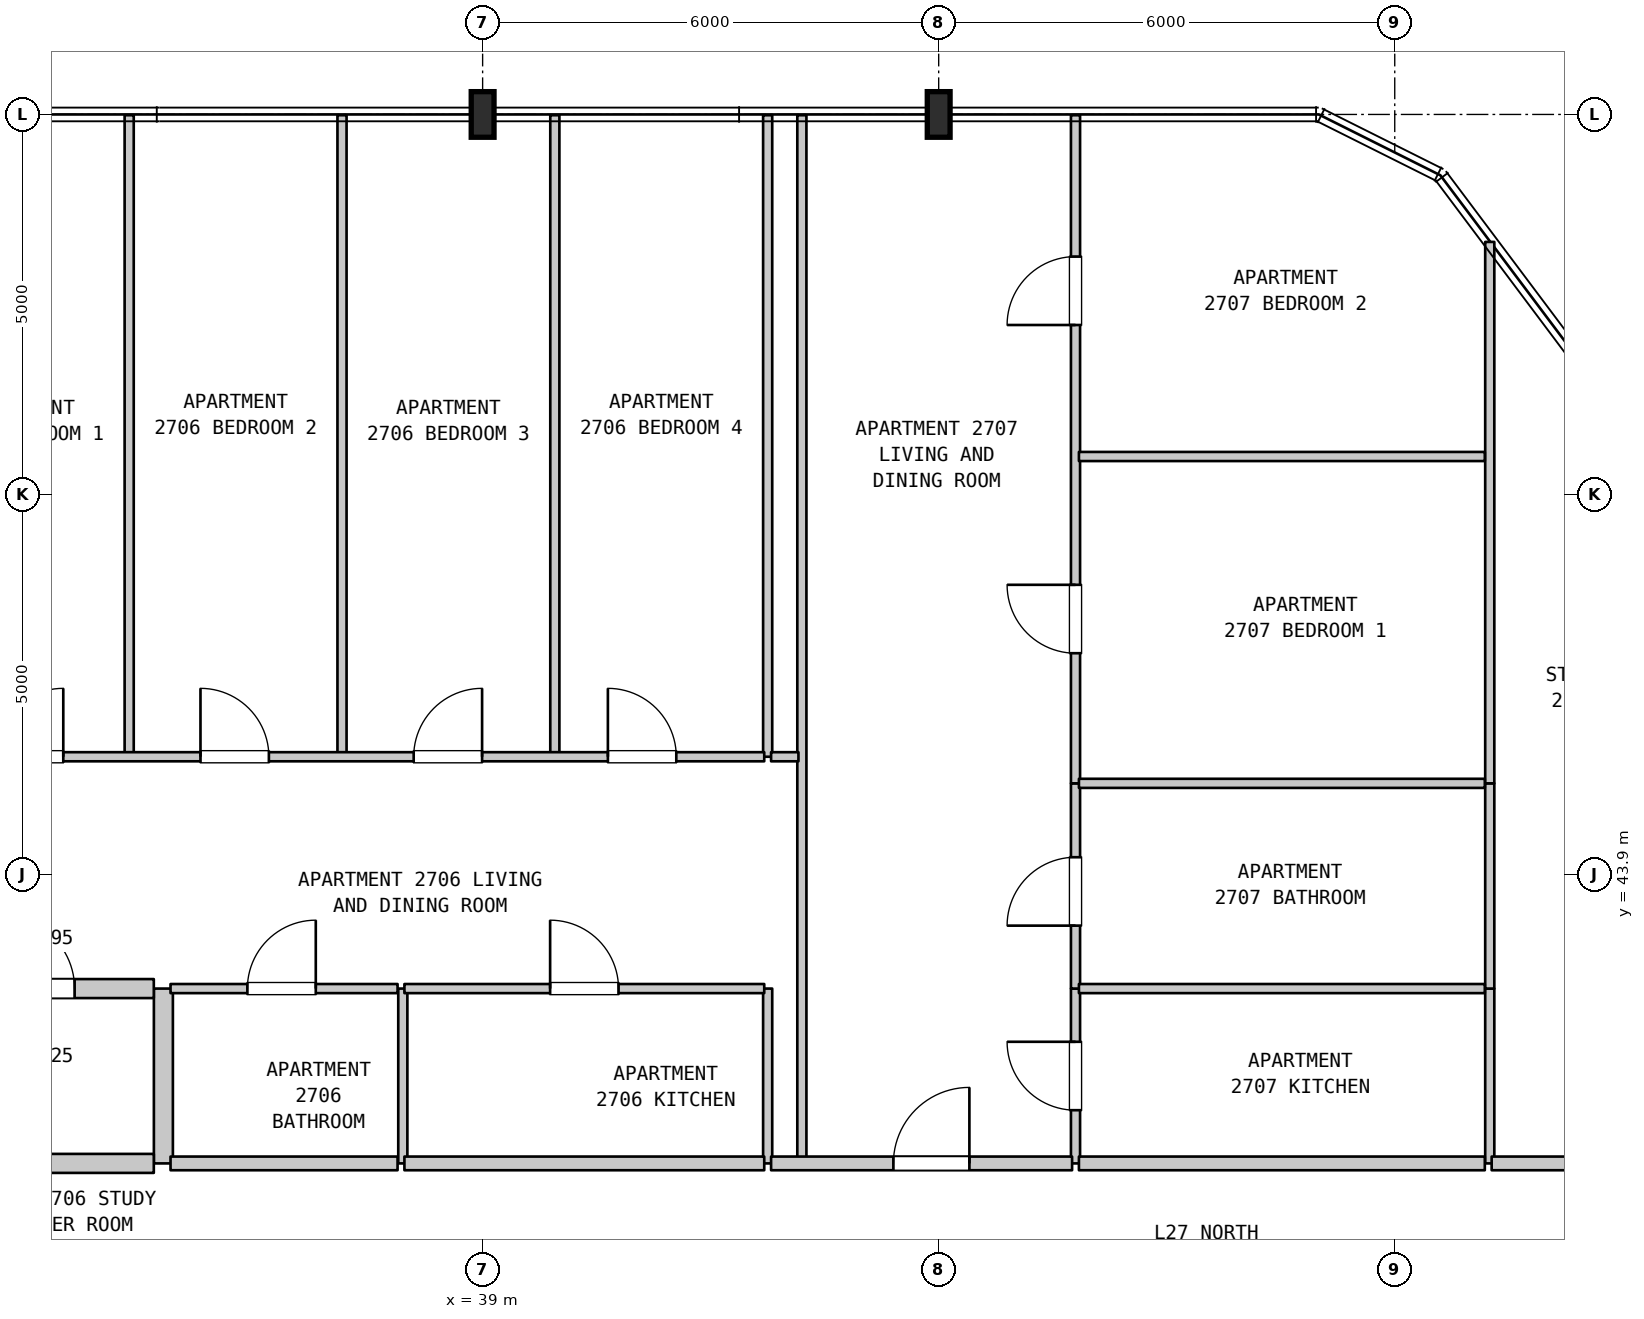
"""IFC4 building model, lengths in metres.
Left out: names, types, materials, properties, quantities, classifications, styles, units other than length and angle.
Written with IfcOpenShell. Run it as: python <this file> out.ifc"""

import sys

from ifc_helpers import new_model, si_unit, direction, frame, frame_2d, origin, origin_2d, place, context, subcontext, project, spatial, rectangle, i_section, extrude, element, fill, save


model = new_model("IFC4")
c1 = context("Model", 3, precision=1e-05, world=origin(), true_north=direction((0.0, 1.0)))
c2 = subcontext(c1, "Body", "Model", "MODEL_VIEW")
j1 = project(units=[si_unit("LENGTHUNIT", "METRE"), si_unit("PLANEANGLEUNIT", "RADIAN")], contexts=[c1])
p1 = place(None, origin())
s1 = spatial("IfcSite", under=j1, at=p1, CompositionType="ELEMENT")
p2 = place(p1, origin())
s2 = spatial("IfcBuilding", under=s1, at=p2, CompositionType="ELEMENT")
p3 = place(p2, frame((0.0, 0.0, 113.1)))
s3 = spatial("IfcBuildingStorey", under=s2, at=p3, CompositionType="ELEMENT", Elevation=113.1)
for number, where, z_axis, x_axis in (
    (1, (39.0, 53.9, 0.0), (0.0, 0.0, 1.0), (1.0, 0.0, 0.0)),
    (2, (45.0, 53.9, 0.0), (0.0, 0.0, 1.0), (1.0, 0.0, 0.0)),
):
    element("IfcColumn", number, at=place(p3, frame(where, z_axis=z_axis, x_axis=x_axis)), inside=s3, PredefinedType="COLUMN", context=c2, shape_type="SweptSolid", body=[
        extrude(i_section(OverallWidth=0.3, OverallDepth=0.6, WebThickness=0.015, FlangeThickness=0.03, FilletRadius=0.027, at=origin_2d()), origin(), (0.0, 0.0, 1.0), 3.7),
    ])
p4 = place(p3, frame((34.35, 45.45, 0.0), z_axis=(0.0, 0.0, 1.0), x_axis=(0.0, 1.0, 0.0)))
e3 = element("IfcWall", 3, at=p4, inside=s3, PredefinedType="PARTITIONING", context=c2, shape_type="SweptSolid", body=[
    extrude(rectangle(XDim=8.44, YDim=0.12, at=frame_2d((4.22, 0.0))), origin(), (0.0, 0.0, 1.0), 3.385),
])
p5 = place(p3, frame((34.8, 40.1, 0.0), z_axis=(0.0, 0.0, 1.0), x_axis=(0.0, 1.0, 0.0)))
e4 = element("IfcWall", 4, at=p5, inside=s3, PredefinedType="STANDARD", context=c2, shape_type="SweptSolid", body=[
    extrude(rectangle(XDim=2.3, YDim=0.25, at=frame_2d((1.15, 0.0))), origin(), (0.0, 0.0, 1.0), 3.385),
])
p6 = place(p3, frame((37.15, 45.45, 0.0), z_axis=(0.0, 0.0, 1.0), x_axis=(0.0, 1.0, 0.0)))
e5 = element("IfcWall", 5, at=p6, inside=s3, PredefinedType="PARTITIONING", context=c2, shape_type="SweptSolid", body=[
    extrude(rectangle(XDim=8.44, YDim=0.12, at=frame_2d((4.22, 0.0))), origin(), (0.0, 0.0, 1.0), 3.385),
])
p7 = place(p3, frame((37.95, 40.1, 0.0), z_axis=(0.0, 0.0, 1.0), x_axis=(0.0, 1.0, 0.0)))
e6 = element("IfcWall", 6, at=p7, inside=s3, PredefinedType="PARTITIONING", context=c2, shape_type="SweptSolid", body=[
    extrude(rectangle(XDim=2.3, YDim=0.12, at=frame_2d((1.15, 0.0))), origin(), (0.0, 0.0, 1.0), 3.385),
])
p8 = place(p3, frame((39.95, 45.45, 0.0), z_axis=(0.0, 0.0, 1.0), x_axis=(0.0, 1.0, 0.0)))
e7 = element("IfcWall", 7, at=p8, inside=s3, PredefinedType="PARTITIONING", context=c2, shape_type="SweptSolid", body=[
    extrude(rectangle(XDim=8.44, YDim=0.12, at=frame_2d((4.22, 0.0))), origin(), (0.0, 0.0, 1.0), 3.385),
])
p9 = place(p3, frame((42.75, 40.1, 0.0), z_axis=(0.0, 0.0, 1.0), x_axis=(0.0, 1.0, 0.0)))
e8 = element("IfcWall", 8, at=p9, inside=s3, PredefinedType="PARTITIONING", context=c2, shape_type="SweptSolid", body=[
    extrude(rectangle(XDim=2.3, YDim=0.12, at=frame_2d((1.15, 0.0))), origin(), (0.0, 0.0, 1.0), 3.385),
])
p10 = place(p3, frame((42.75, 45.45, 0.0), z_axis=(0.0, 0.0, 1.0), x_axis=(0.0, 1.0, 0.0)))
e9 = element("IfcWall", 9, at=p10, inside=s3, PredefinedType="PARTITIONING", context=c2, shape_type="SweptSolid", body=[
    extrude(rectangle(XDim=8.44, YDim=0.12, at=frame_2d((4.22, 0.0))), origin(), (0.0, 0.0, 1.0), 3.385),
])
p11 = place(p3, frame((43.2, 40.1, 0.0), z_axis=(0.0, 0.0, 1.0), x_axis=(0.0, 1.0, 0.0)))
e10 = element("IfcWall", 10, at=p11, inside=s3, PredefinedType="PARTITIONING", context=c2, shape_type="SweptSolid", body=[
    extrude(rectangle(XDim=13.79, YDim=0.12, at=frame_2d((6.895, 0.0))), origin(), (0.0, 0.0, 1.0), 3.385),
])
p12 = place(p3, frame((46.8, 40.1, 0.0), z_axis=(0.0, 0.0, 1.0), x_axis=(0.0, 1.0, 0.0)))
e11 = element("IfcWall", 11, at=p12, inside=s3, PredefinedType="PARTITIONING", context=c2, shape_type="SweptSolid", body=[
    extrude(rectangle(XDim=2.3, YDim=0.12, at=frame_2d((1.15, 0.0))), origin(), (0.0, 0.0, 1.0), 3.385),
])
p13 = place(p12, frame((0.7, 0.0, 0.0)))
e12 = element("IfcOpeningElement", 12, at=p13, cuts=e11, PredefinedType="OPENING", context=c2, shape_type="SweptSolid", body=[
    extrude(rectangle(XDim=0.9, YDim=2.15, at=frame_2d((0.45, 1.075))), frame((0.0, 0.07, 0.0), z_axis=(0.0, -1.0, 0.0), x_axis=(1.0, 0.0, 0.0)), (0.0, 0.0, 1.0), 0.14),
])
p14 = place(p3, frame((46.8, 42.4, 0.0), z_axis=(0.0, 0.0, 1.0), x_axis=(0.0, 1.0, 0.0)))
e13 = element("IfcWall", 13, at=p14, inside=s3, PredefinedType="PARTITIONING", context=c2, shape_type="SweptSolid", body=[
    extrude(rectangle(XDim=2.7, YDim=0.12, at=frame_2d((1.35, 0.0))), origin(), (0.0, 0.0, 1.0), 3.385),
])
p15 = place(p14, frame((0.828, 0.0, 0.0)))
e14 = element("IfcOpeningElement", 14, at=p15, cuts=e13, PredefinedType="OPENING", context=c2, shape_type="SweptSolid", body=[
    extrude(rectangle(XDim=0.9, YDim=2.1, at=frame_2d((0.45, 1.05))), frame((0.0, 0.07, 0.0), z_axis=(0.0, -1.0, 0.0), x_axis=(1.0, 0.0, 0.0)), (0.0, 0.0, 1.0), 0.14),
])
p16 = place(p3, frame((46.8, 45.1, 0.0), z_axis=(0.0, 0.0, 1.0), x_axis=(0.0, 1.0, 0.0)))
e15 = element("IfcWall", 15, at=p16, inside=s3, PredefinedType="PARTITIONING", context=c2, shape_type="SweptSolid", body=[
    extrude(rectangle(XDim=8.79, YDim=0.12, at=frame_2d((4.395, 0.0))), origin(), (0.0, 0.0, 1.0), 3.385),
])
p17 = place(p16, frame((1.712, 0.0, 0.0)))
e16 = element("IfcOpeningElement", 16, at=p17, cuts=e15, PredefinedType="OPENING", context=c2, shape_type="SweptSolid", body=[
    extrude(rectangle(XDim=0.9, YDim=2.15, at=frame_2d((0.45, 1.075))), frame((0.0, 0.07, 0.0), z_axis=(0.0, -1.0, 0.0), x_axis=(1.0, 0.0, 0.0)), (0.0, 0.0, 1.0), 0.14),
])
p18 = place(p16, frame((6.03, 0.0, 0.0)))
e17 = element("IfcOpeningElement", 17, at=p18, cuts=e15, PredefinedType="OPENING", context=c2, shape_type="SweptSolid", body=[
    extrude(rectangle(XDim=0.9, YDim=2.15, at=frame_2d((0.45, 1.075))), frame((0.0, 0.07, 0.0), z_axis=(0.0, -1.0, 0.0), x_axis=(1.0, 0.0, 0.0)), (0.0, 0.0, 1.0), 0.14),
])
p19 = place(p3, frame((52.25, 40.1, 0.0), z_axis=(0.0, 0.0, 1.0), x_axis=(0.0, 1.0, 0.0)))
e18 = element("IfcWall", 18, at=p19, inside=s3, PredefinedType="PARTITIONING", context=c2, shape_type="SweptSolid", body=[
    extrude(rectangle(XDim=2.3, YDim=0.12, at=frame_2d((1.15, 0.0))), origin(), (0.0, 0.0, 1.0), 3.385),
])
p20 = place(p3, frame((52.25, 42.4, 0.0), z_axis=(0.0, 0.0, 1.0), x_axis=(0.0, 1.0, 0.0)))
e19 = element("IfcWall", 19, at=p20, inside=s3, PredefinedType="PARTITIONING", context=c2, shape_type="SweptSolid", body=[
    extrude(rectangle(XDim=2.7, YDim=0.12, at=frame_2d((1.35, 0.0))), origin(), (0.0, 0.0, 1.0), 3.385),
])
p21 = place(p3, frame((52.25, 45.1, 0.0), z_axis=(0.0, 0.0, 1.0), x_axis=(0.0, 1.0, 0.0)))
e20 = element("IfcWall", 20, at=p21, inside=s3, PredefinedType="PARTITIONING", context=c2, shape_type="SweptSolid", body=[
    extrude(rectangle(XDim=7.123, YDim=0.12, at=frame_2d((3.562, 0.0))), origin(), (0.0, 0.0, 1.0), 3.385),
])
p22 = place(p3, frame((31.64, 40.1, 0.0), z_axis=(0.0, 0.0, 1.0), x_axis=(1.0, 0.0, 0.0)))
e21 = element("IfcWall", 21, at=p22, inside=s3, PredefinedType="STANDARD", context=c2, shape_type="SweptSolid", body=[
    extrude(rectangle(XDim=3.034, YDim=0.25, at=frame_2d((1.517, 0.0))), origin(), (0.0, 0.0, 1.0), 3.385),
])
p23 = place(p3, frame((34.894, 40.1, 0.0), z_axis=(0.0, 0.0, 1.0), x_axis=(1.0, 0.0, 0.0)))
e22 = element("IfcWall", 22, at=p23, inside=s3, PredefinedType="STANDARD", context=c2, shape_type="SweptSolid", body=[
    extrude(rectangle(XDim=2.987, YDim=0.18, at=frame_2d((1.494, 0.0))), origin(), (0.0, 0.0, 1.0), 3.385),
])
p24 = place(p3, frame((37.971, 40.1, 0.0), z_axis=(0.0, 0.0, 1.0), x_axis=(1.0, 0.0, 0.0)))
e23 = element("IfcWall", 23, at=p24, inside=s3, PredefinedType="STANDARD", context=c2, shape_type="SweptSolid", body=[
    extrude(rectangle(XDim=4.734, YDim=0.18, at=frame_2d((2.367, 0.0))), origin(), (0.0, 0.0, 1.0), 3.385),
])
p25 = place(p3, frame((42.795, 40.1, 0.0), z_axis=(0.0, 0.0, 1.0), x_axis=(1.0, 0.0, 0.0)))
e24 = element("IfcWall", 24, at=p25, inside=s3, PredefinedType="STANDARD", context=c2, shape_type="SweptSolid", body=[
    extrude(rectangle(XDim=3.96, YDim=0.18, at=frame_2d((1.98, 0.0))), origin(), (0.0, 0.0, 1.0), 3.385),
])
p26 = place(p25, frame((1.609, 0.0, 0.0)))
e25 = element("IfcOpeningElement", 25, at=p26, cuts=e24, PredefinedType="OPENING", context=c2, shape_type="SweptSolid", body=[
    extrude(rectangle(XDim=1.0, YDim=2.15, at=frame_2d((0.5, 1.075))), frame((0.0, 0.1, 0.0), z_axis=(0.0, -1.0, 0.0), x_axis=(1.0, 0.0, 0.0)), (0.0, 0.0, 1.0), 0.2),
])
p27 = place(p3, frame((46.845, 40.1, 0.0), z_axis=(0.0, 0.0, 1.0), x_axis=(1.0, 0.0, 0.0)))
e26 = element("IfcWall", 26, at=p27, inside=s3, PredefinedType="STANDARD", context=c2, shape_type="SweptSolid", body=[
    extrude(rectangle(XDim=5.34, YDim=0.18, at=frame_2d((2.67, 0.0))), origin(), (0.0, 0.0, 1.0), 3.385),
])
p28 = place(p3, frame((52.275, 40.1, 0.0), z_axis=(0.0, 0.0, 1.0), x_axis=(1.0, 0.0, 0.0)))
e27 = element("IfcWall", 27, at=p28, inside=s3, PredefinedType="STANDARD", context=c2, shape_type="SweptSolid", body=[
    extrude(rectangle(XDim=3.51, YDim=0.18, at=frame_2d((1.755, 0.0))), origin(), (0.0, 0.0, 1.0), 3.385),
])
p29 = place(p28, frame((1.185, 0.0, 0.0)))
e28 = element("IfcOpeningElement", 28, at=p29, cuts=e27, PredefinedType="OPENING", context=c2, shape_type="SweptSolid", body=[
    extrude(rectangle(XDim=1.0, YDim=2.15, at=frame_2d((0.5, 1.075))), frame((0.0, 0.1, 0.0), z_axis=(0.0, -1.0, 0.0), x_axis=(1.0, 0.0, 0.0)), (0.0, 0.0, 1.0), 0.2),
])
p30 = place(p3, frame((31.64, 42.4, 0.0), z_axis=(0.0, 0.0, 1.0), x_axis=(1.0, 0.0, 0.0)))
e29 = element("IfcWall", 29, at=p30, inside=s3, PredefinedType="STANDARD", context=c2, shape_type="SweptSolid", body=[
    extrude(rectangle(XDim=3.034, YDim=0.25, at=frame_2d((1.517, 0.0))), origin(), (0.0, 0.0, 1.0), 3.385),
])
p31 = place(p30, frame((1.042, 0.0, 0.0)))
e30 = element("IfcOpeningElement", 30, at=p31, cuts=e29, PredefinedType="OPENING", context=c2, shape_type="SweptSolid", body=[
    extrude(rectangle(XDim=0.95, YDim=2.15, at=frame_2d((0.475, 1.075))), frame((0.0, 0.135, 0.0), z_axis=(0.0, -1.0, 0.0), x_axis=(1.0, 0.0, 0.0)), (0.0, 0.0, 1.0), 0.27),
])
p32 = place(p3, frame((34.894, 42.4, 0.0), z_axis=(0.0, 0.0, 1.0), x_axis=(1.0, 0.0, 0.0)))
e31 = element("IfcWall", 31, at=p32, inside=s3, PredefinedType="PARTITIONING", context=c2, shape_type="SweptSolid", body=[
    extrude(rectangle(XDim=2.987, YDim=0.12, at=frame_2d((1.494, 0.0))), origin(), (0.0, 0.0, 1.0), 3.385),
])
p33 = place(p32, frame((1.011, 0.0, 0.0)))
e32 = element("IfcOpeningElement", 32, at=p33, cuts=e31, PredefinedType="OPENING", context=c2, shape_type="SweptSolid", body=[
    extrude(rectangle(XDim=0.9, YDim=2.1, at=frame_2d((0.45, 1.05))), frame((0.0, 0.07, 0.0), z_axis=(0.0, -1.0, 0.0), x_axis=(1.0, 0.0, 0.0)), (0.0, 0.0, 1.0), 0.14),
])
p34 = place(p3, frame((37.971, 42.4, 0.0), z_axis=(0.0, 0.0, 1.0), x_axis=(1.0, 0.0, 0.0)))
e33 = element("IfcWall", 33, at=p34, inside=s3, PredefinedType="PARTITIONING", context=c2, shape_type="SweptSolid", body=[
    extrude(rectangle(XDim=4.734, YDim=0.12, at=frame_2d((2.367, 0.0))), origin(), (0.0, 0.0, 1.0), 3.385),
])
p35 = place(p34, frame((1.917, 0.0, 0.0)))
e34 = element("IfcOpeningElement", 34, at=p35, cuts=e33, PredefinedType="OPENING", context=c2, shape_type="SweptSolid", body=[
    extrude(rectangle(XDim=0.9, YDim=2.15, at=frame_2d((0.45, 1.075))), frame((0.0, 0.07, 0.0), z_axis=(0.0, -1.0, 0.0), x_axis=(1.0, 0.0, 0.0)), (0.0, 0.0, 1.0), 0.14),
])
for number, where, z_axis, x_axis in (
    (35, (46.845, 42.4, 0.0), (0.0, 0.0, 1.0), (1.0, 0.0, 0.0)),
    (36, (46.845, 45.1, 0.0), (0.0, 0.0, 1.0), (1.0, 0.0, 0.0)),
):
    element("IfcWall", number, at=place(p3, frame(where, z_axis=z_axis, x_axis=x_axis)), inside=s3, PredefinedType="PARTITIONING", context=c2, shape_type="SweptSolid", body=[
        extrude(rectangle(XDim=5.34, YDim=0.12, at=frame_2d((2.67, 0.0))), origin(), (0.0, 0.0, 1.0), 3.385),
    ])
p36 = place(p3, frame((31.575, 45.45, 0.0), z_axis=(0.0, 0.0, 1.0), x_axis=(1.0, 0.0, 0.0)))
e37 = element("IfcWall", 37, at=p36, inside=s3, PredefinedType="PARTITIONING", context=c2, shape_type="SweptSolid", body=[
    extrude(rectangle(XDim=11.13, YDim=0.12, at=frame_2d((5.565, 0.0))), origin(), (0.0, 0.0, 1.0), 3.385),
])
p37 = place(p36, frame((1.008, 0.0, 0.0)))
e38 = element("IfcOpeningElement", 38, at=p37, cuts=e37, PredefinedType="OPENING", context=c2, shape_type="SweptSolid", body=[
    extrude(rectangle(XDim=0.9, YDim=2.15, at=frame_2d((0.45, 1.075))), frame((0.0, 0.07, 0.0), z_axis=(0.0, -1.0, 0.0), x_axis=(1.0, 0.0, 0.0)), (0.0, 0.0, 1.0), 0.14),
])
p38 = place(p36, frame((3.713, 0.0, 0.0)))
e39 = element("IfcOpeningElement", 39, at=p38, cuts=e37, PredefinedType="OPENING", context=c2, shape_type="SweptSolid", body=[
    extrude(rectangle(XDim=0.9, YDim=2.15, at=frame_2d((0.45, 1.075))), frame((0.0, 0.07, 0.0), z_axis=(0.0, -1.0, 0.0), x_axis=(1.0, 0.0, 0.0)), (0.0, 0.0, 1.0), 0.14),
])
p39 = place(p36, frame((6.518, 0.0, 0.0)))
e40 = element("IfcOpeningElement", 40, at=p39, cuts=e37, PredefinedType="OPENING", context=c2, shape_type="SweptSolid", body=[
    extrude(rectangle(XDim=0.9, YDim=2.15, at=frame_2d((0.45, 1.075))), frame((0.0, 0.07, 0.0), z_axis=(0.0, -1.0, 0.0), x_axis=(1.0, 0.0, 0.0)), (0.0, 0.0, 1.0), 0.14),
])
p40 = place(p36, frame((9.073, 0.0, 0.0)))
e41 = element("IfcOpeningElement", 41, at=p40, cuts=e37, PredefinedType="OPENING", context=c2, shape_type="SweptSolid", body=[
    extrude(rectangle(XDim=0.9, YDim=2.15, at=frame_2d((0.45, 1.075))), frame((0.0, 0.07, 0.0), z_axis=(0.0, -1.0, 0.0), x_axis=(1.0, 0.0, 0.0)), (0.0, 0.0, 1.0), 0.14),
])
p41 = place(p3, frame((42.795, 45.45, 0.0), z_axis=(0.0, 0.0, 1.0), x_axis=(1.0, 0.0, 0.0)))
e42 = element("IfcWall", 42, at=p41, inside=s3, PredefinedType="PARTITIONING", context=c2, shape_type="SweptSolid", body=[
    extrude(rectangle(XDim=0.36, YDim=0.12, at=frame_2d((0.18, 0.0))), origin(), (0.0, 0.0, 1.0), 3.385),
])
p42 = place(p3, frame((46.845, 49.4, 0.0), z_axis=(0.0, 0.0, 1.0), x_axis=(1.0, 0.0, 0.0)))
e43 = element("IfcWall", 43, at=p42, inside=s3, PredefinedType="PARTITIONING", context=c2, shape_type="SweptSolid", body=[
    extrude(rectangle(XDim=5.34, YDim=0.12, at=frame_2d((2.67, 0.0))), origin(), (0.0, 0.0, 1.0), 3.385),
])
p43 = place(p13, origin())
e44 = element("IfcDoor", 44, at=p43, inside=s3, OperationType="SINGLE_SWING_RIGHT", PredefinedType="DOOR", context=c2, shape_type="SweptSolid", body=[
    extrude(rectangle(XDim=0.9, YDim=2.15, at=frame_2d((0.45, 1.075))), frame((0.0, 0.025, 0.0), z_axis=(0.0, -1.0, 0.0), x_axis=(1.0, 0.0, 0.0)), (0.0, 0.0, 1.0), 0.05),
])
fill(e12, e44)
p44 = place(p15, origin())
e45 = element("IfcDoor", 45, at=p44, inside=s3, OperationType="SINGLE_SWING_LEFT", PredefinedType="DOOR", context=c2, shape_type="SweptSolid", body=[
    extrude(rectangle(XDim=0.9, YDim=2.1, at=frame_2d((0.45, 1.05))), frame((0.0, 0.025, 0.0), z_axis=(0.0, -1.0, 0.0), x_axis=(1.0, 0.0, 0.0)), (0.0, 0.0, 1.0), 0.05),
])
fill(e14, e45)
p45 = place(p17, origin())
e46 = element("IfcDoor", 46, at=p45, inside=s3, OperationType="SINGLE_SWING_RIGHT", PredefinedType="DOOR", context=c2, shape_type="SweptSolid", body=[
    extrude(rectangle(XDim=0.9, YDim=2.15, at=frame_2d((0.45, 1.075))), frame((0.0, 0.025, 0.0), z_axis=(0.0, -1.0, 0.0), x_axis=(1.0, 0.0, 0.0)), (0.0, 0.0, 1.0), 0.05),
])
fill(e16, e46)
p46 = place(p18, origin())
e47 = element("IfcDoor", 47, at=p46, inside=s3, OperationType="SINGLE_SWING_LEFT", PredefinedType="DOOR", context=c2, shape_type="SweptSolid", body=[
    extrude(rectangle(XDim=0.9, YDim=2.15, at=frame_2d((0.45, 1.075))), frame((0.0, 0.025, 0.0), z_axis=(0.0, -1.0, 0.0), x_axis=(1.0, 0.0, 0.0)), (0.0, 0.0, 1.0), 0.05),
])
fill(e17, e47)
p47 = place(p26, origin())
e48 = element("IfcDoor", 48, at=p47, inside=s3, OperationType="SINGLE_SWING_RIGHT", PredefinedType="DOOR", context=c2, shape_type="SweptSolid", body=[
    extrude(rectangle(XDim=1.0, YDim=2.15, at=frame_2d((0.5, 1.075))), frame((0.0, 0.025, 0.0), z_axis=(0.0, -1.0, 0.0), x_axis=(1.0, 0.0, 0.0)), (0.0, 0.0, 1.0), 0.05),
])
fill(e25, e48)
p48 = place(p31, origin())
e49 = element("IfcDoor", 49, at=p48, inside=s3, OperationType="SINGLE_SWING_LEFT", PredefinedType="DOOR", context=c2, shape_type="SweptSolid", body=[
    extrude(rectangle(XDim=0.95, YDim=2.15, at=frame_2d((0.475, 1.075))), frame((0.0, 0.025, 0.0), z_axis=(0.0, -1.0, 0.0), x_axis=(1.0, 0.0, 0.0)), (0.0, 0.0, 1.0), 0.05),
])
fill(e30, e49)
p49 = place(p33, origin())
e50 = element("IfcDoor", 50, at=p49, inside=s3, OperationType="SINGLE_SWING_RIGHT", PredefinedType="DOOR", context=c2, shape_type="SweptSolid", body=[
    extrude(rectangle(XDim=0.9, YDim=2.1, at=frame_2d((0.45, 1.05))), frame((0.0, 0.025, 0.0), z_axis=(0.0, -1.0, 0.0), x_axis=(1.0, 0.0, 0.0)), (0.0, 0.0, 1.0), 0.05),
])
fill(e32, e50)
p50 = place(p35, origin())
e51 = element("IfcDoor", 51, at=p50, inside=s3, OperationType="SINGLE_SWING_LEFT", PredefinedType="DOOR", context=c2, shape_type="SweptSolid", body=[
    extrude(rectangle(XDim=0.9, YDim=2.15, at=frame_2d((0.45, 1.075))), frame((0.0, 0.025, 0.0), z_axis=(0.0, -1.0, 0.0), x_axis=(1.0, 0.0, 0.0)), (0.0, 0.0, 1.0), 0.05),
])
fill(e34, e51)
p51 = place(p37, origin())
e52 = element("IfcDoor", 52, at=p51, inside=s3, OperationType="SINGLE_SWING_RIGHT", PredefinedType="DOOR", context=c2, shape_type="SweptSolid", body=[
    extrude(rectangle(XDim=0.9, YDim=2.15, at=frame_2d((0.45, 1.075))), frame((0.0, 0.025, 0.0), z_axis=(0.0, -1.0, 0.0), x_axis=(1.0, 0.0, 0.0)), (0.0, 0.0, 1.0), 0.05),
])
fill(e38, e52)
p52 = place(p38, origin())
e53 = element("IfcDoor", 53, at=p52, inside=s3, OperationType="SINGLE_SWING_LEFT", PredefinedType="DOOR", context=c2, shape_type="SweptSolid", body=[
    extrude(rectangle(XDim=0.9, YDim=2.15, at=frame_2d((0.45, 1.075))), frame((0.0, 0.025, 0.0), z_axis=(0.0, -1.0, 0.0), x_axis=(1.0, 0.0, 0.0)), (0.0, 0.0, 1.0), 0.05),
])
fill(e39, e53)
p53 = place(p39, origin())
e54 = element("IfcDoor", 54, at=p53, inside=s3, OperationType="SINGLE_SWING_RIGHT", PredefinedType="DOOR", context=c2, shape_type="SweptSolid", body=[
    extrude(rectangle(XDim=0.9, YDim=2.15, at=frame_2d((0.45, 1.075))), frame((0.0, 0.025, 0.0), z_axis=(0.0, -1.0, 0.0), x_axis=(1.0, 0.0, 0.0)), (0.0, 0.0, 1.0), 0.05),
])
fill(e40, e54)
p54 = place(p40, origin())
e55 = element("IfcDoor", 55, at=p54, inside=s3, OperationType="SINGLE_SWING_LEFT", PredefinedType="DOOR", context=c2, shape_type="SweptSolid", body=[
    extrude(rectangle(XDim=0.9, YDim=2.15, at=frame_2d((0.45, 1.075))), frame((0.0, 0.025, 0.0), z_axis=(0.0, -1.0, 0.0), x_axis=(1.0, 0.0, 0.0)), (0.0, 0.0, 1.0), 0.05),
])
fill(e41, e55)
save(model, sys.argv[1])
